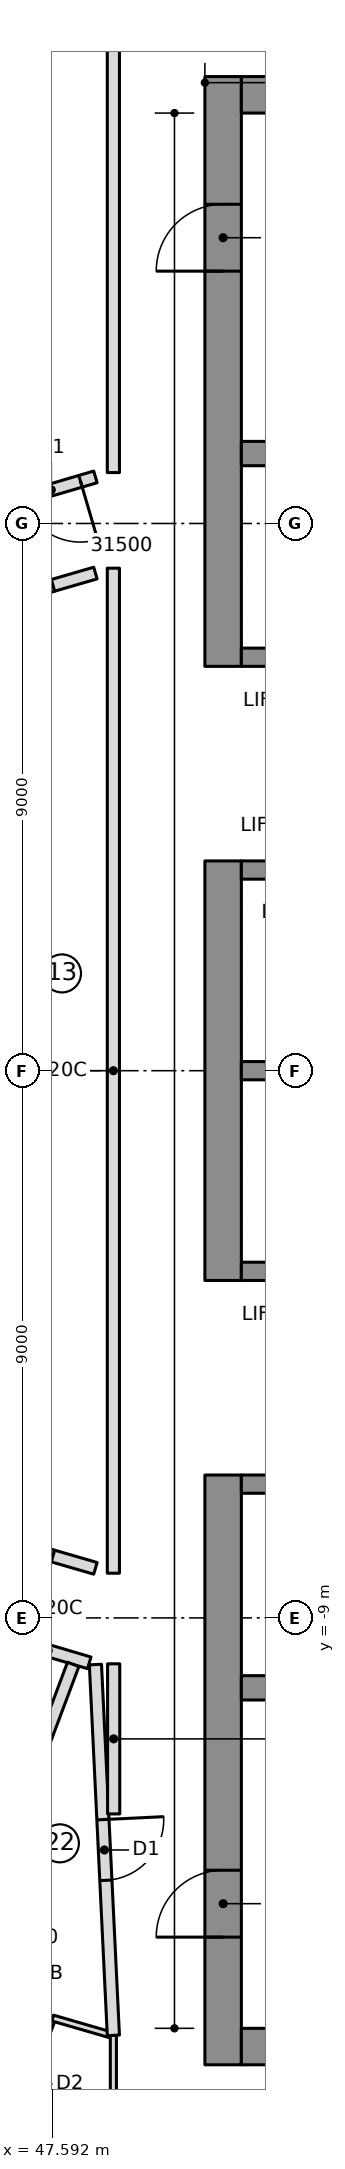
"""IFC4 building model, lengths in metres.
Left out: names, types, materials, properties, quantities, classifications, styles, units other than length and angle.
Written with IfcOpenShell. Run it as: python <this file> out.ifc"""

import sys

from ifc_helpers import new_model, si_unit, direction, frame, frame_2d, origin, place, context, subcontext, project, spatial, rectangle, extrude, element, fill, save


model = new_model("IFC4")
c1 = context("Model", 3, precision=1e-05, world=origin(), true_north=direction((0.0, 1.0)))
c2 = subcontext(c1, "Body", "Model", "MODEL_VIEW")
j1 = project(units=[si_unit("LENGTHUNIT", "METRE"), si_unit("PLANEANGLEUNIT", "RADIAN")], contexts=[c1])
p1 = place(None, origin())
s1 = spatial("IfcSite", under=j1, at=p1, CompositionType="ELEMENT")
p2 = place(p1, origin())
s2 = spatial("IfcBuilding", under=s1, at=p2, CompositionType="ELEMENT")
p3 = place(p2, frame((0.0, 0.0, 249.2)))
s3 = spatial("IfcBuildingStorey", under=s2, at=p3, CompositionType="ELEMENT", Elevation=249.2)
p4 = place(p3, frame((50.4, 6.65, 0.0), z_axis=(0.0, 0.0, 1.0), x_axis=(0.0, 1.0, 0.0)))
e1 = element("IfcWall", 1, at=p4, inside=s3, PredefinedType="SHEAR", context=c2, shape_type="SweptSolid", body=[
    extrude(rectangle(XDim=9.7, YDim=0.6, at=frame_2d((4.85, 0.0))), origin(), (0.0, 0.0, 1.0), 3.55),
])
p5 = place(p4, frame((6.5, 0.0, 0.0)))
e2 = element("IfcOpeningElement", 2, at=p5, cuts=e1, PredefinedType="OPENING", context=c2, shape_type="SweptSolid", body=[
    extrude(rectangle(XDim=1.1, YDim=2.1, at=frame_2d((0.55, 1.05))), frame((0.0, 0.31, 0.0), z_axis=(0.0, -1.0, 0.0), x_axis=(1.0, 0.0, 0.0)), (0.0, 0.0, 1.0), 0.62),
])
p6 = place(p3, frame((50.4, -3.45, 0.0), z_axis=(0.0, 0.0, 1.0), x_axis=(0.0, 1.0, 0.0)))
e3 = element("IfcWall", 3, at=p6, inside=s3, PredefinedType="SHEAR", context=c2, shape_type="SweptSolid", body=[
    extrude(rectangle(XDim=6.9, YDim=0.6, at=frame_2d((3.45, 0.0))), origin(), (0.0, 0.0, 1.0), 3.55),
])
p7 = place(p3, frame((50.4, -16.35, 0.0), z_axis=(0.0, 0.0, 1.0), x_axis=(0.0, 1.0, 0.0)))
e4 = element("IfcWall", 4, at=p7, inside=s3, PredefinedType="SHEAR", context=c2, shape_type="SweptSolid", body=[
    extrude(rectangle(XDim=9.7, YDim=0.6, at=frame_2d((4.85, 0.0))), origin(), (0.0, 0.0, 1.0), 3.55),
])
p8 = place(p7, frame((2.1, 0.0, 0.0)))
e5 = element("IfcOpeningElement", 5, at=p8, cuts=e4, PredefinedType="OPENING", context=c2, shape_type="SweptSolid", body=[
    extrude(rectangle(XDim=1.1, YDim=2.1, at=frame_2d((0.55, 1.05))), frame((0.0, 0.31, 0.0), z_axis=(0.0, -1.0, 0.0), x_axis=(1.0, 0.0, 0.0)), (0.0, 0.0, 1.0), 0.62),
])
for number, where, z_axis, x_axis in (
    (6, (50.7, 16.05, 0.0), (0.0, 0.0, 1.0), (1.0, 0.0, 0.0)),
    (7, (50.7, -16.05, 0.0), (0.0, 0.0, 1.0), (1.0, 0.0, 0.0)),
):
    element("IfcWall", number, at=place(p3, frame(where, z_axis=z_axis, x_axis=x_axis)), inside=s3, PredefinedType="SHEAR", context=c2, shape_type="SweptSolid", body=[
        extrude(rectangle(XDim=13.62, YDim=0.6, at=frame_2d((6.81, 0.0))), origin(), (0.0, 0.0, 1.0), 3.55),
    ])
p9 = place(p3, frame((50.7, 10.15, 0.0), z_axis=(0.0, 0.0, 1.0), x_axis=(1.0, 0.0, 0.0)))
e8 = element("IfcWall", 8, at=p9, inside=s3, PredefinedType="SHEAR", context=c2, shape_type="SweptSolid", body=[
    extrude(rectangle(XDim=13.02, YDim=0.4, at=frame_2d((6.51, 0.0))), origin(), (0.0, 0.0, 1.0), 3.55),
])
p10 = place(p9, frame((0.7, 0.0, 0.0)))
e9 = element("IfcOpeningElement", 9, at=p10, cuts=e8, PredefinedType="OPENING", context=c2, shape_type="SweptSolid", body=[
    extrude(rectangle(XDim=1.1, YDim=2.1, at=frame_2d((0.55, 1.05))), frame((0.0, 0.21, 0.0), z_axis=(0.0, -1.0, 0.0), x_axis=(1.0, 0.0, 0.0)), (0.0, 0.0, 1.0), 0.42),
])
p11 = place(p9, frame((3.5, 0.0, 0.0)))
e10 = element("IfcOpeningElement", 10, at=p11, cuts=e8, PredefinedType="OPENING", context=c2, shape_type="SweptSolid", body=[
    extrude(rectangle(XDim=1.1, YDim=2.1, at=frame_2d((0.55, 1.05))), frame((0.0, 0.21, 0.0), z_axis=(0.0, -1.0, 0.0), x_axis=(1.0, 0.0, 0.0)), (0.0, 0.0, 1.0), 0.42),
])
p12 = place(p3, frame((50.7, -10.15, 0.0), z_axis=(0.0, 0.0, 1.0), x_axis=(1.0, 0.0, 0.0)))
e11 = element("IfcWall", 11, at=p12, inside=s3, PredefinedType="SHEAR", context=c2, shape_type="SweptSolid", body=[
    extrude(rectangle(XDim=13.02, YDim=0.4, at=frame_2d((6.51, 0.0))), origin(), (0.0, 0.0, 1.0), 3.55),
])
p13 = place(p3, frame((50.7, 0.0, 0.0), z_axis=(0.0, 0.0, 1.0), x_axis=(1.0, 0.0, 0.0)))
e12 = element("IfcWall", 12, at=p13, inside=s3, PredefinedType="SHEAR", context=c2, shape_type="SweptSolid", body=[
    extrude(rectangle(XDim=10.9, YDim=0.3, at=frame_2d((5.45, 0.0))), origin(), (0.0, 0.0, 1.0), 3.55),
])
p14 = place(p3, frame((50.7, 3.3, 0.0), z_axis=(0.0, 0.0, 1.0), x_axis=(1.0, 0.0, 0.0)))
e13 = element("IfcWall", 13, at=p14, inside=s3, PredefinedType="SHEAR", context=c2, shape_type="SweptSolid", body=[
    extrude(rectangle(XDim=10.9, YDim=0.3, at=frame_2d((5.45, 0.0))), origin(), (0.0, 0.0, 1.0), 3.55),
])
p15 = place(p14, frame((0.7, 0.0, 0.0)))
e14 = element("IfcOpeningElement", 14, at=p15, cuts=e13, PredefinedType="OPENING", context=c2, shape_type="SweptSolid", body=[
    extrude(rectangle(XDim=1.1, YDim=2.1, at=frame_2d((0.55, 1.05))), frame((0.0, 0.16, 0.0), z_axis=(0.0, -1.0, 0.0), x_axis=(1.0, 0.0, 0.0)), (0.0, 0.0, 1.0), 0.32),
])
p16 = place(p14, frame((3.5, 0.0, 0.0)))
e15 = element("IfcOpeningElement", 15, at=p16, cuts=e13, PredefinedType="OPENING", context=c2, shape_type="SweptSolid", body=[
    extrude(rectangle(XDim=1.1, YDim=2.1, at=frame_2d((0.55, 1.05))), frame((0.0, 0.16, 0.0), z_axis=(0.0, -1.0, 0.0), x_axis=(1.0, 0.0, 0.0)), (0.0, 0.0, 1.0), 0.32),
])
p17 = place(p14, frame((6.4, 0.0, 0.0)))
e16 = element("IfcOpeningElement", 16, at=p17, cuts=e13, PredefinedType="OPENING", context=c2, shape_type="SweptSolid", body=[
    extrude(rectangle(XDim=0.9, YDim=2.1, at=frame_2d((0.45, 1.05))), frame((0.0, 0.16, 0.0), z_axis=(0.0, -1.0, 0.0), x_axis=(1.0, 0.0, 0.0)), (0.0, 0.0, 1.0), 0.32),
])
p18 = place(p14, frame((9.2, 0.0, 0.0)))
e17 = element("IfcOpeningElement", 17, at=p18, cuts=e13, PredefinedType="OPENING", context=c2, shape_type="SweptSolid", body=[
    extrude(rectangle(XDim=0.9, YDim=2.1, at=frame_2d((0.45, 1.05))), frame((0.0, 0.16, 0.0), z_axis=(0.0, -1.0, 0.0), x_axis=(1.0, 0.0, 0.0)), (0.0, 0.0, 1.0), 0.32),
])
p19 = place(p3, frame((50.7, 6.8, 0.0), z_axis=(0.0, 0.0, 1.0), x_axis=(1.0, 0.0, 0.0)))
e18 = element("IfcWall", 18, at=p19, inside=s3, PredefinedType="SHEAR", context=c2, shape_type="SweptSolid", body=[
    extrude(rectangle(XDim=10.9, YDim=0.3, at=frame_2d((5.45, 0.0))), origin(), (0.0, 0.0, 1.0), 3.55),
])
p20 = place(p19, frame((6.4, 0.0, 0.0)))
e19 = element("IfcOpeningElement", 19, at=p20, cuts=e18, PredefinedType="OPENING", context=c2, shape_type="SweptSolid", body=[
    extrude(rectangle(XDim=0.9, YDim=2.1, at=frame_2d((0.45, 1.05))), frame((0.0, 0.16, 0.0), z_axis=(0.0, -1.0, 0.0), x_axis=(1.0, 0.0, 0.0)), (0.0, 0.0, 1.0), 0.32),
])
p21 = place(p19, frame((9.2, 0.0, 0.0)))
e20 = element("IfcOpeningElement", 20, at=p21, cuts=e18, PredefinedType="OPENING", context=c2, shape_type="SweptSolid", body=[
    extrude(rectangle(XDim=0.9, YDim=2.1, at=frame_2d((0.45, 1.05))), frame((0.0, 0.16, 0.0), z_axis=(0.0, -1.0, 0.0), x_axis=(1.0, 0.0, 0.0)), (0.0, 0.0, 1.0), 0.32),
])
p22 = place(p3, frame((50.7, -3.3, 0.0), z_axis=(0.0, 0.0, 1.0), x_axis=(1.0, 0.0, 0.0)))
e21 = element("IfcWall", 21, at=p22, inside=s3, PredefinedType="SHEAR", context=c2, shape_type="SweptSolid", body=[
    extrude(rectangle(XDim=10.9, YDim=0.3, at=frame_2d((5.45, 0.0))), origin(), (0.0, 0.0, 1.0), 3.55),
])
p23 = place(p22, frame((9.1, 0.0, 0.0)))
e22 = element("IfcOpeningElement", 22, at=p23, cuts=e21, PredefinedType="OPENING", context=c2, shape_type="SweptSolid", body=[
    extrude(rectangle(XDim=1.1, YDim=2.1, at=frame_2d((0.55, 1.05))), frame((0.0, 0.16, 0.0), z_axis=(0.0, -1.0, 0.0), x_axis=(1.0, 0.0, 0.0)), (0.0, 0.0, 1.0), 0.32),
])
p24 = place(p3, frame((50.7, -6.8, 0.0), z_axis=(0.0, 0.0, 1.0), x_axis=(1.0, 0.0, 0.0)))
e23 = element("IfcWall", 23, at=p24, inside=s3, PredefinedType="SHEAR", context=c2, shape_type="SweptSolid", body=[
    extrude(rectangle(XDim=10.9, YDim=0.3, at=frame_2d((5.45, 0.0))), origin(), (0.0, 0.0, 1.0), 3.55),
])
p25 = place(p24, frame((6.3, 0.0, 0.0)))
e24 = element("IfcOpeningElement", 24, at=p25, cuts=e23, PredefinedType="OPENING", context=c2, shape_type="SweptSolid", body=[
    extrude(rectangle(XDim=1.1, YDim=2.1, at=frame_2d((0.55, 1.05))), frame((0.0, 0.16, 0.0), z_axis=(0.0, -1.0, 0.0), x_axis=(1.0, 0.0, 0.0)), (0.0, 0.0, 1.0), 0.32),
])
p26 = place(p24, frame((9.1, 0.0, 0.0)))
e25 = element("IfcOpeningElement", 25, at=p26, cuts=e23, PredefinedType="OPENING", context=c2, shape_type="SweptSolid", body=[
    extrude(rectangle(XDim=1.1, YDim=2.1, at=frame_2d((0.55, 1.05))), frame((0.0, 0.16, 0.0), z_axis=(0.0, -1.0, 0.0), x_axis=(1.0, 0.0, 0.0)), (0.0, 0.0, 1.0), 0.32),
])
p27 = place(p24, frame((0.8, 0.0, 0.0)))
e26 = element("IfcOpeningElement", 26, at=p27, cuts=e23, PredefinedType="OPENING", context=c2, shape_type="SweptSolid", body=[
    extrude(rectangle(XDim=0.9, YDim=2.1, at=frame_2d((0.45, 1.05))), frame((0.0, 0.16, 0.0), z_axis=(0.0, -1.0, 0.0), x_axis=(1.0, 0.0, 0.0)), (0.0, 0.0, 1.0), 0.32),
])
p28 = place(p24, frame((3.6, 0.0, 0.0)))
e27 = element("IfcOpeningElement", 27, at=p28, cuts=e23, PredefinedType="OPENING", context=c2, shape_type="SweptSolid", body=[
    extrude(rectangle(XDim=0.9, YDim=2.1, at=frame_2d((0.45, 1.05))), frame((0.0, 0.16, 0.0), z_axis=(0.0, -1.0, 0.0), x_axis=(1.0, 0.0, 0.0)), (0.0, 0.0, 1.0), 0.32),
])
p29 = place(p3, frame((46.85, -9.34, 0.0), z_axis=(0.0, 0.0, 1.0), x_axis=(0.958866391875, -0.283857785753, 0.0)))
e28 = element("IfcWall", 28, at=p29, inside=s3, PredefinedType="PARTITIONING", context=c2, shape_type="SweptSolid", body=[
    extrude(rectangle(XDim=1.406, YDim=0.2, at=frame_2d((0.703, 0.0))), origin(), (0.0, 0.0, 1.0), 3.25),
])
p30 = place(p3, frame((44.56, -18.762, 0.0), z_axis=(0.0, 0.0, 1.0), x_axis=(0.35112901071, 0.936327089129, 0.0)))
e29 = element("IfcWall", 29, at=p30, inside=s3, PredefinedType="PARTITIONING", context=c2, shape_type="SweptSolid", body=[
    extrude(rectangle(XDim=9.608, YDim=0.2, at=frame_2d((4.804, 0.0))), origin(), (0.0, 0.0, 1.0), 3.25),
])
p31 = place(p3, frame((46.788, -17.741, 0.0), z_axis=(0.0, 0.0, 1.0), x_axis=(0.351158236187, 0.936316128857, 0.0)))
e30 = element("IfcWall", 30, at=p31, inside=s3, PredefinedType="PARTITIONING", context=c2, shape_type="SweptSolid", body=[
    extrude(rectangle(XDim=2.307, YDim=0.1, at=frame_2d((1.153, 0.0))), origin(), (0.0, 0.0, 1.0), 3.25),
])
p32 = place(p31, frame((0.75, 0.0, 0.0)))
e31 = element("IfcOpeningElement", 31, at=p32, cuts=e30, PredefinedType="OPENING", context=c2, shape_type="SweptSolid", body=[
    extrude(rectangle(XDim=0.8, YDim=2.1, at=frame_2d((0.4, 1.05))), frame((0.0, 0.06, 0.0), z_axis=(0.0, -1.0, 0.0), x_axis=(1.0, 0.0, 0.0)), (0.0, 0.0, 1.0), 0.12),
])
p33 = place(p3, frame((47.598, -15.582, 0.0), z_axis=(0.0, 0.0, 1.0), x_axis=(0.960468222897, -0.278389642057, 0.0)))
e32 = element("IfcWall", 32, at=p33, inside=s3, PredefinedType="PARTITIONING", context=c2, shape_type="SweptSolid", body=[
    extrude(rectangle(XDim=1.019, YDim=0.1, at=frame_2d((0.51, 0.0))), origin(), (0.0, 0.0, 1.0), 3.25),
])
for number, where, z_axis, x_axis in (
    (33, (46.85, 7.748, 0.0), (0.0, 0.0, 1.0), (0.955, 0.298, 0.0)),
    (34, (47.602, -7.982, 0.0), (0.0, 0.0, 1.0), (-0.955, 0.298, 0.0)),
):
    element("IfcWall", number, at=place(p3, frame(where, z_axis=z_axis, x_axis=x_axis)), inside=s3, PredefinedType="PARTITIONING", context=c2, shape_type="SweptSolid", body=[
        extrude(rectangle(XDim=0.788, YDim=0.2, at=frame_2d((0.394, 0.0))), origin(), (0.0, 0.0, 1.0), 3.25),
    ])
p34 = place(p3, frame((48.595, -15.866, 0.0), z_axis=(0.0, 0.0, 1.0), x_axis=(0.0, -1.0, 0.0)))
e35 = element("IfcWall", 35, at=p34, inside=s3, PredefinedType="PARTITIONING", context=c2, shape_type="SweptSolid", body=[
    extrude(rectangle(XDim=2.431, YDim=0.1, at=frame_2d((1.215, 0.0))), origin(), (0.0, 0.0, 1.0), 3.25),
])
p35 = place(p3, frame((48.3, 9.766, 0.0), z_axis=(0.0, 0.0, 1.0), x_axis=(-0.95944263903, -0.281903924079, 0.0)))
e36 = element("IfcWall", 36, at=p35, inside=s3, PredefinedType="PARTITIONING", context=c2, shape_type="SweptSolid", body=[
    extrude(rectangle(XDim=1.511, YDim=0.2, at=frame_2d((0.756, 0.0))), origin(), (0.0, 0.0, 1.0), 3.25),
])
p36 = place(p35, frame((0.256, 0.0, 0.0)))
e37 = element("IfcOpeningElement", 37, at=p36, cuts=e36, PredefinedType="OPENING", context=c2, shape_type="SweptSolid", body=[
    extrude(rectangle(XDim=1.0, YDim=2.1, at=frame_2d((0.5, 1.05))), frame((0.0, 0.11, 0.0), z_axis=(0.0, -1.0, 0.0), x_axis=(1.0, 0.0, 0.0)), (0.0, 0.0, 1.0), 0.22),
])
for number, where, z_axis, x_axis in (
    (38, (47.602, 7.982, 0.0), (0.0, 0.0, 1.0), (0.96, 0.278, 0.0)),
    (39, (48.3, -8.185, 0.0), (0.0, 0.0, 1.0), (-0.96, 0.278, 0.0)),
):
    element("IfcWall", number, at=place(p3, frame(where, z_axis=z_axis, x_axis=x_axis)), inside=s3, PredefinedType="PARTITIONING", context=c2, shape_type="SweptSolid", body=[
        extrude(rectangle(XDim=0.727, YDim=0.2, at=frame_2d((0.363, 0.0))), origin(), (0.0, 0.0, 1.0), 3.25),
    ])
p37 = place(p3, frame((48.3, -9.767, 0.0), z_axis=(0.0, 0.0, 1.0), x_axis=(0.048302241024, -0.998832765538, 0.0)))
e40 = element("IfcWall", 40, at=p37, inside=s3, PredefinedType="PARTITIONING", context=c2, shape_type="SweptSolid", body=[
    extrude(rectangle(XDim=6.106, YDim=0.2, at=frame_2d((3.053, 0.0))), origin(), (0.0, 0.0, 1.0), 3.25),
])
p38 = place(p37, frame((2.553, 0.0, 0.0)))
e41 = element("IfcOpeningElement", 41, at=p38, cuts=e40, PredefinedType="OPENING", context=c2, shape_type="SweptSolid", body=[
    extrude(rectangle(XDim=1.0, YDim=2.1, at=frame_2d((0.5, 1.05))), frame((0.0, 0.11, 0.0), z_axis=(0.0, -1.0, 0.0), x_axis=(1.0, 0.0, 0.0)), (0.0, 0.0, 1.0), 0.22),
])
p39 = place(p3, frame((48.595, 8.265, 0.0), z_axis=(0.0, 0.0, 1.0), x_axis=(0.0, -1.0, 0.0)))
e42 = element("IfcWall", 42, at=p39, inside=s3, PredefinedType="PARTITIONING", context=c2, shape_type="SweptSolid", body=[
    extrude(rectangle(XDim=16.53, YDim=0.2, at=frame_2d((8.265, 0.0))), origin(), (0.0, 0.0, 1.0), 3.25),
])
p40 = place(p3, frame((48.595, 19.929, 0.0), z_axis=(0.0, 0.0, 1.0), x_axis=(0.0, -1.0, 0.0)))
e43 = element("IfcWall", 43, at=p40, inside=s3, PredefinedType="PARTITIONING", context=c2, shape_type="SweptSolid", body=[
    extrude(rectangle(XDim=10.093, YDim=0.2, at=frame_2d((5.046, 0.0))), origin(), (0.0, 0.0, 1.0), 3.25),
])
p41 = place(p3, frame((48.6, -12.224, 0.0), z_axis=(0.0, 0.0, 1.0), x_axis=(0.0, 1.0, 0.0)))
e44 = element("IfcWall", 44, at=p41, inside=s3, PredefinedType="PARTITIONING", context=c2, shape_type="SweptSolid", body=[
    extrude(rectangle(XDim=2.469, YDim=0.2, at=frame_2d((1.234, 0.0))), origin(), (0.0, 0.0, 1.0), 3.25),
])
p42 = place(p36, origin())
e45 = element("IfcDoor", 45, at=p42, inside=s3, OperationType="SINGLE_SWING_LEFT", PredefinedType="DOOR", context=c2, shape_type="SweptSolid", body=[
    extrude(rectangle(XDim=1.0, YDim=2.1, at=frame_2d((0.5, 1.05))), frame((0.0, 0.025, 0.0), z_axis=(0.0, -1.0, 0.0), x_axis=(1.0, 0.0, 0.0)), (0.0, 0.0, 1.0), 0.05),
])
fill(e37, e45)
p43 = place(p38, origin())
e46 = element("IfcDoor", 46, at=p43, inside=s3, OperationType="SINGLE_SWING_LEFT", PredefinedType="DOOR", context=c2, shape_type="SweptSolid", body=[
    extrude(rectangle(XDim=1.0, YDim=2.1, at=frame_2d((0.5, 1.05))), frame((0.0, 0.025, 0.0), z_axis=(0.0, -1.0, 0.0), x_axis=(1.0, 0.0, 0.0)), (0.0, 0.0, 1.0), 0.05),
])
fill(e41, e46)
p44 = place(p5, origin())
e47 = element("IfcDoor", 47, at=p44, inside=s3, OperationType="SINGLE_SWING_RIGHT", PredefinedType="DOOR", context=c2, shape_type="SweptSolid", body=[
    extrude(rectangle(XDim=1.1, YDim=2.1, at=frame_2d((0.55, 1.05))), frame((0.0, 0.025, 0.0), z_axis=(0.0, -1.0, 0.0), x_axis=(1.0, 0.0, 0.0)), (0.0, 0.0, 1.0), 0.05),
])
fill(e2, e47)
p45 = place(p8, origin())
e48 = element("IfcDoor", 48, at=p45, inside=s3, OperationType="SINGLE_SWING_RIGHT", PredefinedType="DOOR", context=c2, shape_type="SweptSolid", body=[
    extrude(rectangle(XDim=1.1, YDim=2.1, at=frame_2d((0.55, 1.05))), frame((0.0, 0.025, 0.0), z_axis=(0.0, -1.0, 0.0), x_axis=(1.0, 0.0, 0.0)), (0.0, 0.0, 1.0), 0.05),
])
fill(e5, e48)
save(model, sys.argv[1])
